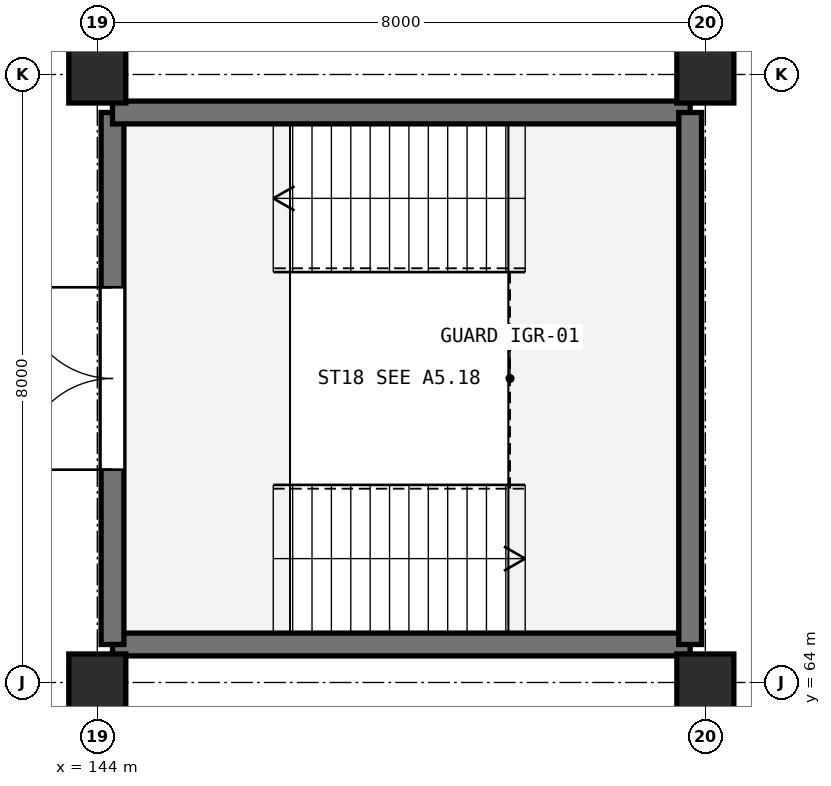
"""IFC4 building model, lengths in metres.
Left out: names, types, materials, properties, quantities, classifications, styles, units other than length and angle.
Written with IfcOpenShell. Run it as: python <this file> out.ifc"""

import sys

from ifc_helpers import new_model, si_unit, direction, frame, frame_2d, origin, origin_2d, place, context, subcontext, project, spatial, rectangle, extrude, element, fill, save


model = new_model("IFC4")
c1 = context("Model", 3, precision=1e-05, world=origin(), true_north=direction((0.0, 1.0)))
c2 = subcontext(c1, "Body", "Model", "MODEL_VIEW")
j1 = project(units=[si_unit("LENGTHUNIT", "METRE"), si_unit("PLANEANGLEUNIT", "RADIAN")], contexts=[c1])
p1 = place(None, origin())
s1 = spatial("IfcSite", under=j1, at=p1, CompositionType="ELEMENT")
p2 = place(p1, origin())
s2 = spatial("IfcBuilding", under=s1, at=p2, CompositionType="ELEMENT")
p3 = place(p2, frame((0.0, 0.0, -4.8)))
s3 = spatial("IfcBuildingStorey", under=s2, at=p3, CompositionType="ELEMENT", Elevation=-4.8)
for number, where, z_axis, x_axis in (
    (1, (144.0, 64.0, 0.0), (0.0, 0.0, 1.0), (1.0, 0.0, 0.0)),
    (2, (144.0, 72.0, 0.0), (0.0, 0.0, 1.0), (1.0, 0.0, 0.0)),
    (3, (152.0, 64.0, 0.0), (0.0, 0.0, 1.0), (1.0, 0.0, 0.0)),
    (4, (152.0, 72.0, 0.0), (0.0, 0.0, 1.0), (1.0, 0.0, 0.0)),
):
    element("IfcColumn", number, at=place(p3, frame(where, z_axis=z_axis, x_axis=x_axis)), inside=s3, PredefinedType="COLUMN", context=c2, shape_type="SweptSolid", body=[
        extrude(rectangle(XDim=0.75, YDim=0.75, at=origin_2d()), origin(), (0.0, 0.0, 1.0), 4.8),
    ])
p4 = place(p3, frame((151.8, 64.5, 0.0), z_axis=(0.0, 0.0, 1.0), x_axis=(-1.0, 0.0, 0.0)))
e5 = element("IfcWall", 5, at=p4, inside=s3, PredefinedType="SHEAR", context=c2, shape_type="SweptSolid", body=[
    extrude(rectangle(XDim=7.6, YDim=0.3, at=frame_2d((3.8, 0.0))), origin(), (0.0, 0.0, 1.0), 4.46),
])
p5 = place(p3, frame((144.2, 64.5, 0.0), z_axis=(0.0, 0.0, 1.0), x_axis=(0.0, 1.0, 0.0)))
e6 = element("IfcWall", 6, at=p5, inside=s3, PredefinedType="SHEAR", context=c2, shape_type="SweptSolid", body=[
    extrude(rectangle(XDim=7.0, YDim=0.3, at=frame_2d((3.5, 0.0))), origin(), (0.0, 0.0, 1.0), 4.46),
])
p6 = place(p5, frame((2.3, 0.0, 0.0)))
e7 = element("IfcOpeningElement", 7, at=p6, cuts=e6, PredefinedType="OPENING", context=c2, shape_type="SweptSolid", body=[
    extrude(rectangle(XDim=2.4, YDim=2.2, at=frame_2d((1.2, 1.1))), frame((0.0, 0.16, 0.0), z_axis=(0.0, -1.0, 0.0), x_axis=(1.0, 0.0, 0.0)), (0.0, 0.0, 1.0), 0.32),
])
p7 = place(p3, frame((144.2, 71.5, 0.0), z_axis=(0.0, 0.0, 1.0), x_axis=(1.0, 0.0, 0.0)))
e8 = element("IfcWall", 8, at=p7, inside=s3, PredefinedType="SHEAR", context=c2, shape_type="SweptSolid", body=[
    extrude(rectangle(XDim=7.6, YDim=0.3, at=frame_2d((3.8, 0.0))), origin(), (0.0, 0.0, 1.0), 4.46),
])
p8 = place(p3, frame((151.8, 71.5, 0.0), z_axis=(0.0, 0.0, 1.0), x_axis=(0.0, -1.0, 0.0)))
e9 = element("IfcWall", 9, at=p8, inside=s3, PredefinedType="SHEAR", context=c2, shape_type="SweptSolid", body=[
    extrude(rectangle(XDim=7.0, YDim=0.3, at=frame_2d((3.5, 0.0))), origin(), (0.0, 0.0, 1.0), 4.46),
])
p9 = place(p6, frame((2.4, 0.0, 0.0), z_axis=(0.0, 0.0, 1.0), x_axis=(-1.0, 0.0, 0.0)))
e10 = element("IfcDoor", 10, at=p9, inside=s3, OperationType="DOUBLE_DOOR_SINGLE_SWING", PredefinedType="DOOR", context=c2, shape_type="SweptSolid", body=[
    extrude(rectangle(XDim=2.4, YDim=2.2, at=frame_2d((1.2, 1.1))), frame((0.0, 0.025, 0.0), z_axis=(0.0, -1.0, 0.0), x_axis=(1.0, 0.0, 0.0)), (0.0, 0.0, 1.0), 0.05),
])
fill(e7, e10)
save(model, sys.argv[1])
